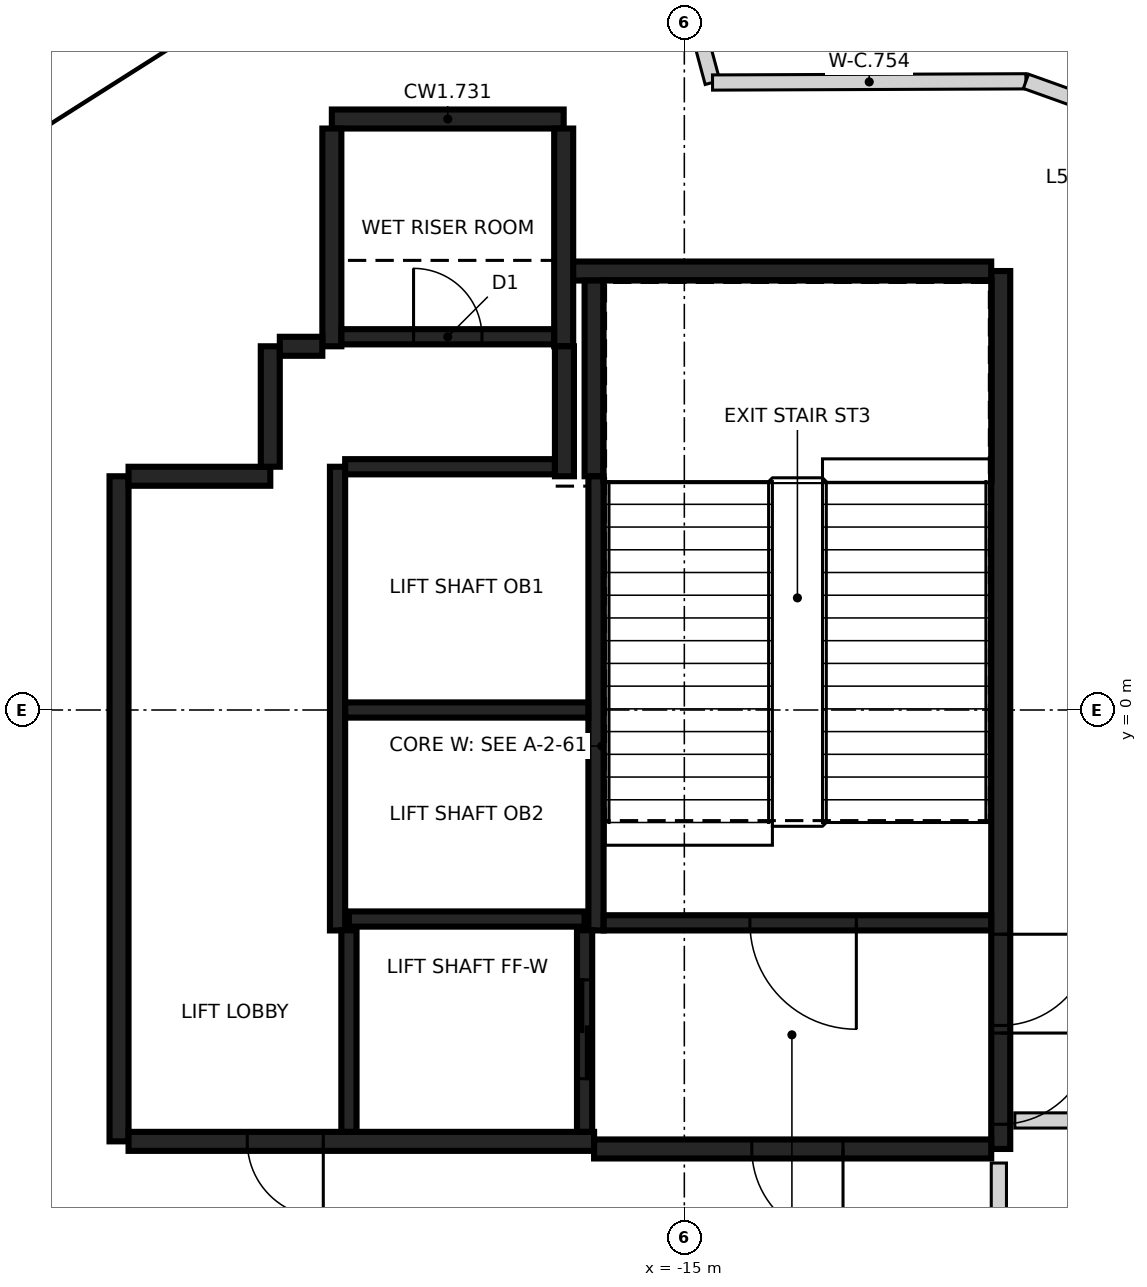
"""IFC4 building model, lengths in metres.
Left out: names, types, materials, properties, quantities, classifications, styles, units other than length and angle.
Written with IfcOpenShell. Run it as: python <this file> out.ifc"""

import sys

from ifc_helpers import new_model, si_unit, direction, frame, frame_2d, origin, place, context, subcontext, project, spatial, rectangle, extrude, element, fill, save


model = new_model("IFC4")
c1 = context("Model", 3, precision=1e-05, world=origin(), true_north=direction((0.0, 1.0)))
c2 = subcontext(c1, "Body", "Model", "MODEL_VIEW")
j1 = project(units=[si_unit("LENGTHUNIT", "METRE"), si_unit("PLANEANGLEUNIT", "RADIAN")], contexts=[c1])
p1 = place(None, origin())
s1 = spatial("IfcSite", under=j1, at=p1, CompositionType="ELEMENT")
p2 = place(p1, origin())
s2 = spatial("IfcBuilding", under=s1, at=p2, CompositionType="ELEMENT")
p3 = place(p2, frame((0.0, 0.0, 211.6)))
s3 = spatial("IfcBuildingStorey", under=s2, at=p3, CompositionType="ELEMENT", Elevation=211.6)
p4 = place(p3, frame((-10.837, 5.775, 0.0), z_axis=(0.0, 0.0, 1.0), x_axis=(0.0, -1.0, 0.0)))
e1 = element("IfcWall", 1, at=p4, inside=s3, PredefinedType="SHEAR", context=c2, shape_type="SweptSolid", body=[
    extrude(rectangle(XDim=11.55, YDim=0.25, at=frame_2d((5.775, 0.0))), origin(), (0.0, 0.0, 1.0), 4.45),
])
p5 = place(p4, frame((10.025, 0.0, 0.0)))
e2 = element("IfcOpeningElement", 2, at=p5, cuts=e1, PredefinedType="OPENING", context=c2, shape_type="SweptSolid", body=[
    extrude(rectangle(XDim=1.2, YDim=2.1, at=frame_2d((0.6, 1.05))), frame((0.0, 0.135, 0.0), z_axis=(0.0, -1.0, 0.0), x_axis=(1.0, 0.0, 0.0)), (0.0, 0.0, 1.0), 0.27),
])
p6 = place(p4, frame((8.725, 0.0, 0.0)))
e3 = element("IfcOpeningElement", 3, at=p6, cuts=e1, PredefinedType="OPENING", context=c2, shape_type="SweptSolid", body=[
    extrude(rectangle(XDim=1.2, YDim=2.1, at=frame_2d((0.6, 1.05))), frame((0.0, 0.135, 0.0), z_axis=(0.0, -1.0, 0.0), x_axis=(1.0, 0.0, 0.0)), (0.0, 0.0, 1.0), 0.27),
])
p7 = place(p3, frame((-22.437, -5.675, 0.0), z_axis=(0.0, 0.0, 1.0), x_axis=(0.0, 1.0, 0.0)))
e4 = element("IfcWall", 4, at=p7, inside=s3, PredefinedType="SHEAR", context=c2, shape_type="SweptSolid", body=[
    extrude(rectangle(XDim=8.75, YDim=0.25, at=frame_2d((4.375, 0.0))), origin(), (0.0, 0.0, 1.0), 4.45),
])
p8 = place(p3, frame((-16.187, -5.675, 0.0), z_axis=(0.0, 0.0, 1.0), x_axis=(-1.0, 0.0, 0.0)))
e5 = element("IfcWall", 5, at=p8, inside=s3, PredefinedType="SHEAR", context=c2, shape_type="SweptSolid", body=[
    extrude(rectangle(XDim=6.125, YDim=0.25, at=frame_2d((3.062, 0.0))), origin(), (0.0, 0.0, 1.0), 4.45),
])
p9 = place(p8, frame((3.563, 0.0, 0.0)))
e6 = element("IfcOpeningElement", 6, at=p9, cuts=e5, PredefinedType="OPENING", context=c2, shape_type="SweptSolid", body=[
    extrude(rectangle(XDim=1.0, YDim=2.1, at=frame_2d((0.5, 1.05))), frame((0.0, 0.135, 0.0), z_axis=(0.0, -1.0, 0.0), x_axis=(1.0, 0.0, 0.0)), (0.0, 0.0, 1.0), 0.27),
])
p10 = place(p3, frame((-10.963, -5.775, 0.0), z_axis=(0.0, 0.0, 1.0), x_axis=(-1.0, 0.0, 0.0)))
e7 = element("IfcWall", 7, at=p10, inside=s3, PredefinedType="SHEAR", context=c2, shape_type="SweptSolid", body=[
    extrude(rectangle(XDim=5.225, YDim=0.25, at=frame_2d((2.612, 0.0))), origin(), (0.0, 0.0, 1.0), 4.45),
])
p11 = place(p10, frame((1.95, 0.0, 0.0)))
e8 = element("IfcOpeningElement", 8, at=p11, cuts=e7, PredefinedType="OPENING", context=c2, shape_type="SweptSolid", body=[
    extrude(rectangle(XDim=1.2, YDim=2.1, at=frame_2d((0.6, 1.05))), frame((0.0, 0.135, 0.0), z_axis=(0.0, -1.0, 0.0), x_axis=(1.0, 0.0, 0.0)), (0.0, 0.0, 1.0), 0.27),
])
p12 = place(p3, frame((-16.472, 5.775, 0.0), z_axis=(0.0, 0.0, 1.0), x_axis=(1.0, 0.0, 0.0)))
e9 = element("IfcWall", 9, at=p12, inside=s3, PredefinedType="SHEAR", context=c2, shape_type="SweptSolid", body=[
    extrude(rectangle(XDim=5.51, YDim=0.25, at=frame_2d((2.755, 0.0))), origin(), (0.0, 0.0, 1.0), 4.45),
])
p13 = place(p3, frame((-19.637, 7.775, 0.0), z_axis=(0.0, 0.0, 1.0), x_axis=(1.0, 0.0, 0.0)))
e10 = element("IfcWall", 10, at=p13, inside=s3, PredefinedType="SHEAR", context=c2, shape_type="SweptSolid", body=[
    extrude(rectangle(XDim=3.05, YDim=0.25, at=frame_2d((1.525, 0.0))), origin(), (0.0, 0.0, 1.0), 4.45),
])
for number, where, z_axis, x_axis in (
    (11, (-16.587, 7.65, 0.0), (0.0, 0.0, 1.0), (0.0, -1.0, 0.0)),
    (12, (-19.637, 4.785, 0.0), (0.0, 0.0, 1.0), (0.0, 1.0, 0.0)),
):
    element("IfcWall", number, at=place(p3, frame(where, z_axis=z_axis, x_axis=x_axis)), inside=s3, PredefinedType="SHEAR", context=c2, shape_type="SweptSolid", body=[
        extrude(rectangle(XDim=2.865, YDim=0.25, at=frame_2d((1.432, 0.0))), origin(), (0.0, 0.0, 1.0), 4.45),
    ])
p14 = place(p3, frame((-16.187, 3.075, 0.0), z_axis=(0.0, 0.0, 1.0), x_axis=(0.0, 1.0, 0.0)))
e13 = element("IfcWall", 13, at=p14, inside=s3, PredefinedType="SHEAR", context=c2, shape_type="SweptSolid", body=[
    extrude(rectangle(XDim=2.575, YDim=0.25, at=frame_2d((1.287, 0.0))), origin(), (0.0, 0.0, 1.0), 4.45),
])
p15 = place(p3, frame((-22.312, 3.075, 0.0), z_axis=(0.0, 0.0, 1.0), x_axis=(1.0, 0.0, 0.0)))
e14 = element("IfcWall", 14, at=p15, inside=s3, PredefinedType="SHEAR", context=c2, shape_type="SweptSolid", body=[
    extrude(rectangle(XDim=1.865, YDim=0.25, at=frame_2d((0.932, 0.0))), origin(), (0.0, 0.0, 1.0), 4.45),
])
p16 = place(p3, frame((-16.577, 4.785, 0.0), z_axis=(0.0, 0.0, 1.0), x_axis=(0.0, -1.0, 0.0)))
e15 = element("IfcWall", 15, at=p16, inside=s3, PredefinedType="SHEAR", context=c2, shape_type="SweptSolid", body=[
    extrude(rectangle(XDim=1.71, YDim=0.25, at=frame_2d((0.855, 0.0))), origin(), (0.0, 0.0, 1.0), 4.45),
])
p17 = place(p3, frame((-20.447, 3.2, 0.0), z_axis=(0.0, 0.0, 1.0), x_axis=(0.0, 1.0, 0.0)))
e16 = element("IfcWall", 16, at=p17, inside=s3, PredefinedType="SHEAR", context=c2, shape_type="SweptSolid", body=[
    extrude(rectangle(XDim=1.584, YDim=0.25, at=frame_2d((0.792, 0.0))), origin(), (0.0, 0.0, 1.0), 4.45),
])
p18 = place(p3, frame((-20.322, 4.785, 0.0), z_axis=(0.0, 0.0, 1.0), x_axis=(1.0, 0.0, 0.0)))
e17 = element("IfcWall", 17, at=p18, inside=s3, PredefinedType="SHEAR", context=c2, shape_type="SweptSolid", body=[
    extrude(rectangle(XDim=0.559, YDim=0.25, at=frame_2d((0.28, 0.0))), origin(), (0.0, 0.0, 1.0), 4.45),
])
p19 = place(p3, frame((-16.162, 3.074, 0.0), z_axis=(0.0, 0.0, 1.0), x_axis=(0.0, -1.0, 0.0)))
e18 = element("IfcWall", 18, at=p19, inside=s3, PredefinedType="SHEAR", context=c2, shape_type="SweptSolid", body=[
    extrude(rectangle(XDim=5.974, YDim=0.2, at=frame_2d((2.987, 0.0))), origin(), (0.0, 0.0, 1.0), 4.45),
])
p20 = place(p3, frame((-19.562, -2.9, 0.0), z_axis=(0.0, 0.0, 1.0), x_axis=(0.0, 1.0, 0.0)))
e19 = element("IfcWall", 19, at=p20, inside=s3, PredefinedType="SHEAR", context=c2, shape_type="SweptSolid", body=[
    extrude(rectangle(XDim=6.1, YDim=0.2, at=frame_2d((3.05, 0.0))), origin(), (0.0, 0.0, 1.0), 4.45),
])
p21 = place(p3, frame((-10.963, -2.8, 0.0), z_axis=(0.0, 0.0, 1.0), x_axis=(-1.0, 0.0, 0.0)))
e20 = element("IfcWall", 20, at=p21, inside=s3, PredefinedType="SHEAR", context=c2, shape_type="SweptSolid", body=[
    extrude(rectangle(XDim=5.098, YDim=0.2, at=frame_2d((2.549, 0.0))), origin(), (0.0, 0.0, 1.0), 4.45),
])
p22 = place(p21, frame((1.774, 0.0, 0.0)))
e21 = element("IfcOpeningElement", 21, at=p22, cuts=e20, PredefinedType="OPENING", context=c2, shape_type="SweptSolid", body=[
    extrude(rectangle(XDim=1.4, YDim=2.1, at=frame_2d((0.7, 1.05))), frame((0.0, 0.11, 0.0), z_axis=(0.0, -1.0, 0.0), x_axis=(1.0, 0.0, 0.0)), (0.0, 0.0, 1.0), 0.22),
])
p23 = place(p3, frame((-16.263, 0.0, 0.0), z_axis=(0.0, 0.0, 1.0), x_axis=(-1.0, 0.0, 0.0)))
e22 = element("IfcWall", 22, at=p23, inside=s3, PredefinedType="SHEAR", context=c2, shape_type="SweptSolid", body=[
    extrude(rectangle(XDim=3.198, YDim=0.2, at=frame_2d((1.599, 0.0))), origin(), (0.0, 0.0, 1.0), 4.45),
])
p24 = place(p3, frame((-19.511, 4.91, 0.0), z_axis=(0.0, 0.0, 1.0), x_axis=(1.0, 0.0, 0.0)))
e23 = element("IfcWall", 23, at=p24, inside=s3, PredefinedType="SHEAR", context=c2, shape_type="SweptSolid", body=[
    extrude(rectangle(XDim=2.798, YDim=0.2, at=frame_2d((1.399, 0.0))), origin(), (0.0, 0.0, 1.0), 4.45),
])
p25 = place(p24, frame((0.949, 0.0, 0.0)))
e24 = element("IfcOpeningElement", 24, at=p25, cuts=e23, PredefinedType="OPENING", context=c2, shape_type="SweptSolid", body=[
    extrude(rectangle(XDim=0.9, YDim=2.1, at=frame_2d((0.45, 1.05))), frame((0.0, 0.11, 0.0), z_axis=(0.0, -1.0, 0.0), x_axis=(1.0, 0.0, 0.0)), (0.0, 0.0, 1.0), 0.22),
])
p26 = place(p3, frame((-19.462, 3.2, 0.0), z_axis=(0.0, 0.0, 1.0), x_axis=(1.0, 0.0, 0.0)))
e25 = element("IfcWall", 25, at=p26, inside=s3, PredefinedType="SHEAR", context=c2, shape_type="SweptSolid", body=[
    extrude(rectangle(XDim=2.759, YDim=0.2, at=frame_2d((1.379, 0.0))), origin(), (0.0, 0.0, 1.0), 4.45),
])
p27 = place(p3, frame((-19.412, -2.75, 0.0), z_axis=(0.0, 0.0, 1.0), x_axis=(1.0, 0.0, 0.0)))
e26 = element("IfcWall", 26, at=p27, inside=s3, PredefinedType="SHEAR", context=c2, shape_type="SweptSolid", body=[
    extrude(rectangle(XDim=3.1, YDim=0.2, at=frame_2d((1.55, 0.0))), origin(), (0.0, 0.0, 1.0), 4.45),
])
p28 = place(p3, frame((-16.312, -2.898, 0.0), z_axis=(0.0, 0.0, 1.0), x_axis=(0.0, -1.0, 0.0)))
e27 = element("IfcWall", 27, at=p28, inside=s3, PredefinedType="SHEAR", context=c2, shape_type="SweptSolid", body=[
    extrude(rectangle(XDim=2.651, YDim=0.2, at=frame_2d((1.325, 0.0))), origin(), (0.0, 0.0, 1.0), 4.45),
])
p29 = place(p28, frame((0.652, 0.0, 0.0)))
e28 = element("IfcOpeningElement", 28, at=p29, cuts=e27, PredefinedType="OPENING", context=c2, shape_type="SweptSolid", body=[
    extrude(rectangle(XDim=1.3, YDim=2.1, at=frame_2d((0.65, 1.05))), frame((0.0, 0.11, 0.0), z_axis=(0.0, -1.0, 0.0), x_axis=(1.0, 0.0, 0.0)), (0.0, 0.0, 1.0), 0.22),
])
p30 = place(p3, frame((-19.412, -5.549, 0.0), z_axis=(0.0, 0.0, 1.0), x_axis=(0.0, 1.0, 0.0)))
e29 = element("IfcWall", 29, at=p30, inside=s3, PredefinedType="SHEAR", context=c2, shape_type="SweptSolid", body=[
    extrude(rectangle(XDim=2.651, YDim=0.2, at=frame_2d((1.325, 0.0))), origin(), (0.0, 0.0, 1.0), 4.45),
])
p31 = place(p3, frame((-14.768, 8.773, 0.0), z_axis=(0.0, 0.0, 1.0), x_axis=(0.259418497784, -0.965765004029, 0.0)))
e30 = element("IfcWall", 30, at=p31, inside=s3, PredefinedType="PARTITIONING", context=c2, shape_type="SweptSolid", body=[
    extrude(rectangle(XDim=0.536, YDim=0.2, at=frame_2d((0.268, 0.0))), origin(), (0.0, 0.0, 1.0), 4.45),
])
p32 = place(p3, frame((-14.629, 8.255, 0.0), z_axis=(0.0, 0.0, 1.0), x_axis=(0.999992362559, 0.003908302003, 0.0)))
e31 = element("IfcWall", 31, at=p32, inside=s3, PredefinedType="PARTITIONING", context=c2, shape_type="SweptSolid", body=[
    extrude(rectangle(XDim=4.123, YDim=0.2, at=frame_2d((2.062, 0.0))), origin(), (0.0, 0.0, 1.0), 4.45),
])
p33 = place(p3, frame((-10.862, -7.3, 0.0), z_axis=(0.0, 0.0, 1.0), x_axis=(0.0, 1.0, 0.0)))
e32 = element("IfcWall", 32, at=p33, inside=s3, PredefinedType="PARTITIONING", context=c2, shape_type="SweptSolid", body=[
    extrude(rectangle(XDim=1.34, YDim=0.2, at=frame_2d((0.67, 0.0))), origin(), (0.0, 0.0, 1.0), 4.45),
])
p34 = place(p3, frame((-10.652, -5.4, 0.0), z_axis=(0.0, 0.0, 1.0), x_axis=(1.0, 0.0, 0.0)))
e33 = element("IfcWall", 33, at=p34, inside=s3, PredefinedType="PARTITIONING", context=c2, shape_type="SweptSolid", body=[
    extrude(rectangle(XDim=2.083, YDim=0.2, at=frame_2d((1.042, 0.0))), origin(), (0.0, 0.0, 1.0), 4.45),
])
p35 = place(p3, frame((-10.506, 8.271, 0.0), z_axis=(0.0, 0.0, 1.0), x_axis=(0.941499917848, -0.337013211451, 0.0)))
e34 = element("IfcWall", 34, at=p35, inside=s3, PredefinedType="PARTITIONING", context=c2, shape_type="SweptSolid", body=[
    extrude(rectangle(XDim=1.439, YDim=0.2, at=frame_2d((0.72, 0.0))), origin(), (0.0, 0.0, 1.0), 4.45),
])
p36 = place(p3, frame((-9.905, -7.714, 0.0), z_axis=(0.0, 0.0, 1.0), x_axis=(0.499368495827, 0.866389696023, 0.0)))
e35 = element("IfcWall", 35, at=p36, inside=s3, PredefinedType="PARTITIONING", context=c2, shape_type="SweptSolid", body=[
    extrude(rectangle(XDim=2.667, YDim=0.2, at=frame_2d((1.334, 0.0))), origin(), (0.0, 0.0, 1.0), 4.45),
])
p37 = place(p29, origin())
e36 = element("IfcDoor", 36, at=p37, inside=s3, OperationType="SLIDING_TO_LEFT", PredefinedType="DOOR", context=c2, shape_type="SweptSolid", body=[
    extrude(rectangle(XDim=1.3, YDim=2.1, at=frame_2d((0.65, 1.05))), frame((0.0, 0.025, 0.0), z_axis=(0.0, -1.0, 0.0), x_axis=(1.0, 0.0, 0.0)), (0.0, 0.0, 1.0), 0.05),
])
fill(e28, e36)
p38 = place(p9, origin())
e37 = element("IfcDoor", 37, at=p38, inside=s3, OperationType="SINGLE_SWING_LEFT", PredefinedType="DOOR", context=c2, shape_type="SweptSolid", body=[
    extrude(rectangle(XDim=1.0, YDim=2.1, at=frame_2d((0.5, 1.05))), frame((0.0, 0.025, 0.0), z_axis=(0.0, -1.0, 0.0), x_axis=(1.0, 0.0, 0.0)), (0.0, 0.0, 1.0), 0.05),
])
fill(e6, e37)
p39 = place(p5, origin())
e38 = element("IfcDoor", 38, at=p39, inside=s3, OperationType="SINGLE_SWING_LEFT", PredefinedType="DOOR", context=c2, shape_type="SweptSolid", body=[
    extrude(rectangle(XDim=1.2, YDim=2.1, at=frame_2d((0.6, 1.05))), frame((0.0, 0.025, 0.0), z_axis=(0.0, -1.0, 0.0), x_axis=(1.0, 0.0, 0.0)), (0.0, 0.0, 1.0), 0.05),
])
fill(e2, e38)
p40 = place(p6, origin())
e39 = element("IfcDoor", 39, at=p40, inside=s3, OperationType="SINGLE_SWING_RIGHT", PredefinedType="DOOR", context=c2, shape_type="SweptSolid", body=[
    extrude(rectangle(XDim=1.2, YDim=2.1, at=frame_2d((0.6, 1.05))), frame((0.0, 0.025, 0.0), z_axis=(0.0, -1.0, 0.0), x_axis=(1.0, 0.0, 0.0)), (0.0, 0.0, 1.0), 0.05),
])
fill(e3, e39)
p41 = place(p22, origin())
e40 = element("IfcDoor", 40, at=p41, inside=s3, OperationType="SINGLE_SWING_LEFT", PredefinedType="DOOR", context=c2, shape_type="SweptSolid", body=[
    extrude(rectangle(XDim=1.4, YDim=2.1, at=frame_2d((0.7, 1.05))), frame((0.0, 0.025, 0.0), z_axis=(0.0, -1.0, 0.0), x_axis=(1.0, 0.0, 0.0)), (0.0, 0.0, 1.0), 0.05),
])
fill(e21, e40)
p42 = place(p25, origin())
e41 = element("IfcDoor", 41, at=p42, inside=s3, OperationType="SINGLE_SWING_RIGHT", PredefinedType="DOOR", context=c2, shape_type="SweptSolid", body=[
    extrude(rectangle(XDim=0.9, YDim=2.1, at=frame_2d((0.45, 1.05))), frame((0.0, 0.025, 0.0), z_axis=(0.0, -1.0, 0.0), x_axis=(1.0, 0.0, 0.0)), (0.0, 0.0, 1.0), 0.05),
])
fill(e24, e41)
p43 = place(p11, origin())
e42 = element("IfcDoor", 42, at=p43, inside=s3, OperationType="SINGLE_SWING_RIGHT", PredefinedType="DOOR", context=c2, shape_type="SweptSolid", body=[
    extrude(rectangle(XDim=1.2, YDim=2.1, at=frame_2d((0.6, 1.05))), frame((0.0, 0.025, 0.0), z_axis=(0.0, -1.0, 0.0), x_axis=(1.0, 0.0, 0.0)), (0.0, 0.0, 1.0), 0.05),
])
fill(e8, e42)
save(model, sys.argv[1])
